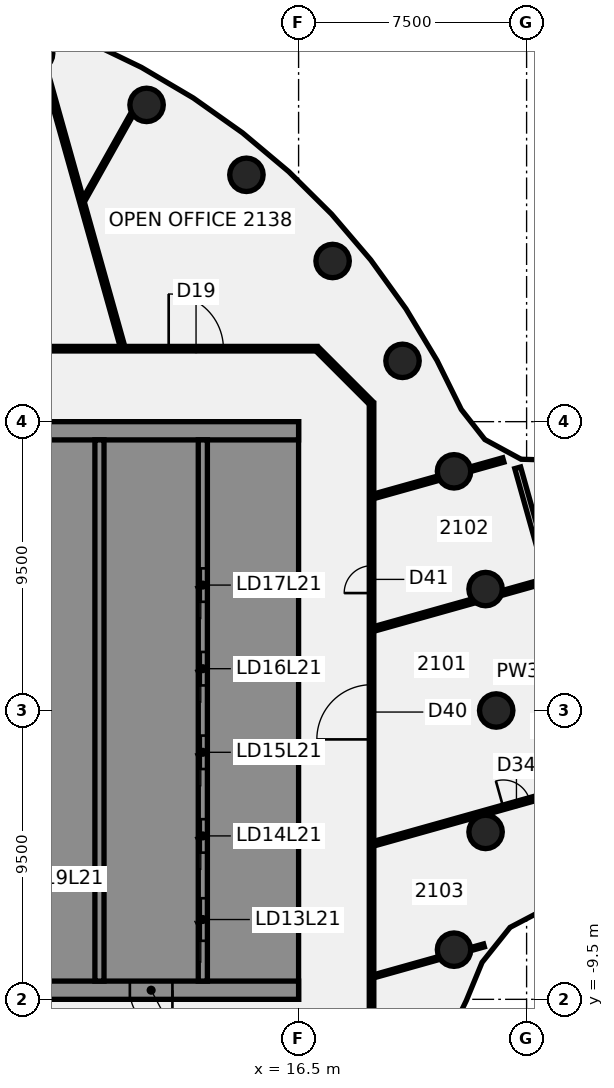
"""IFC4 building model, lengths in metres.
Left out: names, types, materials, properties, quantities, classifications, styles, units other than length and angle.
Written with IfcOpenShell. Run it as: python <this file> out.ifc"""

import sys

from ifc_helpers import new_model, si_unit, direction, frame, frame_2d, origin, origin_2d, place, context, subcontext, project, spatial, polyline, rectangle, circle, outline, extrude, element, fill, save


model = new_model("IFC4")
c1 = context("Model", 3, precision=1e-05, world=origin(), true_north=direction((0.0, 1.0)))
c2 = subcontext(c1, "Body", "Model", "MODEL_VIEW")
j1 = project(units=[si_unit("LENGTHUNIT", "METRE"), si_unit("PLANEANGLEUNIT", "RADIAN")], contexts=[c1])
p1 = place(None, origin())
s1 = spatial("IfcSite", under=j1, at=p1, CompositionType="ELEMENT")
p2 = place(p1, origin())
s2 = spatial("IfcBuilding", under=s1, at=p2, CompositionType="ELEMENT")
p3 = place(p2, frame((0.0, 0.0, 91.0)))
s3 = spatial("IfcBuildingStorey", under=s2, at=p3, CompositionType="ELEMENT", Elevation=91.0)
for number, where, z_axis, x_axis in (
    (1, (23.0, 0.0, -0.14), (0.0, 0.0, 1.0), (1.0, 0.0, 0.0)),
    (2, (22.651, 3.994, -0.14), (0.0, 0.0, 1.0), (1.0, 0.0, 0.0)),
    (3, (21.613, 7.866, -0.14), (0.0, 0.0, 1.0), (1.0, 0.0, 0.0)),
    (4, (19.919, 11.5, -0.14), (0.0, 0.0, 1.0), (1.0, 0.0, 0.0)),
    (5, (17.619, 14.784, -0.14), (0.0, 0.0, 1.0), (1.0, 0.0, 0.0)),
    (6, (14.784, 17.619, -0.14), (0.0, 0.0, 1.0), (1.0, 0.0, 0.0)),
    (7, (11.5, 19.919, -0.14), (0.0, 0.0, 1.0), (1.0, 0.0, 0.0)),
    (8, (7.866, 21.613, -0.14), (0.0, 0.0, 1.0), (1.0, 0.0, 0.0)),
    (9, (21.613, -7.866, -0.14), (0.0, 0.0, 1.0), (1.0, 0.0, 0.0)),
    (10, (22.651, -3.994, -0.14), (0.0, 0.0, 1.0), (1.0, 0.0, 0.0)),
):
    element("IfcColumn", number, at=place(p3, frame(where, z_axis=z_axis, x_axis=x_axis)), inside=s3, PredefinedType="COLUMN", context=c2, shape_type="SweptSolid", body=[
        extrude(circle(Radius=0.55, at=origin_2d()), origin(), (0.0, 0.0, 1.0), 3.75),
    ])
p4 = place(p3, frame((8.139, 21.126, 0.0), z_axis=(0.0, 0.0, 1.0), x_axis=(0.270065431149, -0.962841971924, 0.0)))
e11 = element("IfcWall", 11, at=p4, inside=s3, PredefinedType="PARTITIONING", context=c2, shape_type="SweptSolid", body=[
    extrude(rectangle(XDim=9.502, YDim=0.15, at=frame_2d((4.751, 0.0))), origin(), (0.0, 0.0, 1.0), 3.01),
])
p5 = place(p3, frame((23.707, 7.982, 0.0), z_axis=(0.0, 0.0, 1.0), x_axis=(0.270046796754, -0.96284719845, 0.0)))
e12 = element("IfcWall", 12, at=p5, inside=s3, PredefinedType="PARTITIONING", context=c2, shape_type="SweptSolid", body=[
    extrude(rectangle(XDim=13.924, YDim=0.2, at=frame_2d((6.962, 0.0))), origin(), (0.0, 0.0, 1.0), 3.01),
])
p6 = place(p5, frame((6.324, 0.0, 0.0)))
e13 = element("IfcOpeningElement", 13, at=p6, cuts=e12, PredefinedType="OPENING", context=c2, shape_type="SweptSolid", body=[
    extrude(rectangle(XDim=1.4, YDim=2.1, at=frame_2d((0.7, 1.05))), frame((0.0, 0.11, 0.0), z_axis=(0.0, -1.0, 0.0), x_axis=(1.0, 0.0, 0.0)), (0.0, 0.0, 1.0), 0.22),
])
p7 = place(p3, frame((17.128, 11.872, 0.0), z_axis=(0.0, 0.0, 1.0), x_axis=(0.707106781187, -0.707106781187, 0.0)))
e14 = element("IfcWall", 14, at=p7, inside=s3, PredefinedType="PARTITIONING", context=c2, shape_type="SweptSolid", body=[
    extrude(rectangle(XDim=2.465, YDim=0.15, at=frame_2d((1.232, 0.0))), origin(), (0.0, 0.0, 1.0), 3.01),
])
p8 = place(p3, frame((-17.065, 11.9, 0.0), z_axis=(0.0, 0.0, 1.0), x_axis=(1.0, 0.0, 0.0)))
e15 = element("IfcWall", 15, at=p8, inside=s3, PredefinedType="PARTITIONING", context=c2, shape_type="SweptSolid", body=[
    extrude(rectangle(XDim=34.165, YDim=0.15, at=frame_2d((17.083, 0.0))), origin(), (0.0, 0.0, 1.0), 3.01),
])
p9 = place(p8, frame((19.067, 0.0, 0.0)))
e16 = element("IfcOpeningElement", 16, at=p9, cuts=e15, PredefinedType="OPENING", context=c2, shape_type="SweptSolid", body=[
    extrude(rectangle(XDim=1.8, YDim=2.1, at=frame_2d((0.9, 1.05))), frame((0.0, 0.085, 0.0), z_axis=(0.0, -1.0, 0.0), x_axis=(1.0, 0.0, 0.0)), (0.0, 0.0, 1.0), 0.17),
])
p10 = place(p8, frame((29.292, 0.0, 0.0)))
e17 = element("IfcOpeningElement", 17, at=p10, cuts=e15, PredefinedType="OPENING", context=c2, shape_type="SweptSolid", body=[
    extrude(rectangle(XDim=1.8, YDim=2.1, at=frame_2d((0.9, 1.05))), frame((0.0, 0.085, 0.0), z_axis=(0.0, -1.0, 0.0), x_axis=(1.0, 0.0, 0.0)), (0.0, 0.0, 1.0), 0.17),
])
p11 = place(p8, frame((5.215, 0.0, 0.0)))
e18 = element("IfcOpeningElement", 18, at=p11, cuts=e15, PredefinedType="OPENING", context=c2, shape_type="SweptSolid", body=[
    extrude(rectangle(XDim=1.8, YDim=2.1, at=frame_2d((0.9, 1.05))), frame((0.0, 0.085, 0.0), z_axis=(0.0, -1.0, 0.0), x_axis=(1.0, 0.0, 0.0)), (0.0, 0.0, 1.0), 0.17),
])
p12 = place(p3, frame((18.977, -4.379, 0.0), z_axis=(0.0, 0.0, 1.0), x_axis=(0.962819006097, 0.270147295932, 0.0)))
e19 = element("IfcWall", 19, at=p12, inside=s3, PredefinedType="PARTITIONING", context=c2, shape_type="SweptSolid", body=[
    extrude(rectangle(XDim=7.788, YDim=0.15, at=frame_2d((3.894, 0.0))), origin(), (0.0, 0.0, 1.0), 3.01),
])
p13 = place(p12, frame((4.42, 0.0, 0.0)))
e20 = element("IfcOpeningElement", 20, at=p13, cuts=e19, PredefinedType="OPENING", context=c2, shape_type="SweptSolid", body=[
    extrude(rectangle(XDim=0.9, YDim=2.1, at=frame_2d((0.45, 1.05))), frame((0.0, 0.085, 0.0), z_axis=(0.0, -1.0, 0.0), x_axis=(1.0, 0.0, 0.0)), (0.0, 0.0, 1.0), 0.17),
])
p14 = place(p3, frame((18.977, 2.684, 0.0), z_axis=(0.0, 0.0, 1.0), x_axis=(0.962845365639, 0.270053331526, 0.0)))
e21 = element("IfcWall", 21, at=p14, inside=s3, PredefinedType="PARTITIONING", context=c2, shape_type="SweptSolid", body=[
    extrude(rectangle(XDim=3.422, YDim=0.15, at=frame_2d((1.711, 0.0))), origin(), (0.0, 0.0, 1.0), 3.01),
])
p15 = place(p3, frame((23.175, 3.861, 0.0), z_axis=(0.0, 0.0, 1.0), x_axis=(0.962859226114, 0.270003908653, 0.0)))
e22 = element("IfcWall", 22, at=p15, inside=s3, PredefinedType="PARTITIONING", context=c2, shape_type="SweptSolid", body=[
    extrude(rectangle(XDim=1.525, YDim=0.15, at=frame_2d((0.763, 0.0))), origin(), (0.0, 0.0, 1.0), 3.01),
])
p16 = place(p3, frame((18.977, 7.046, 0.0), z_axis=(0.0, 0.0, 1.0), x_axis=(0.962846161083, 0.270050495442, 0.0)))
e23 = element("IfcWall", 23, at=p16, inside=s3, PredefinedType="PARTITIONING", context=c2, shape_type="SweptSolid", body=[
    extrude(rectangle(XDim=2.218, YDim=0.15, at=frame_2d((1.109, 0.0))), origin(), (0.0, 0.0, 1.0), 3.01),
])
p17 = place(p3, frame((22.154, 7.937, 0.0), z_axis=(0.0, 0.0, 1.0), x_axis=(0.962819188594, 0.2701466455, 0.0)))
e24 = element("IfcWall", 24, at=p17, inside=s3, PredefinedType="PARTITIONING", context=c2, shape_type="SweptSolid", body=[
    extrude(rectangle(XDim=1.122, YDim=0.15, at=frame_2d((0.561, 0.0))), origin(), (0.0, 0.0, 1.0), 3.01),
])
p18 = place(p3, frame((18.972, -8.743, 0.0), z_axis=(0.0, 0.0, 1.0), x_axis=(0.962855122656, 0.270018541538, 0.0)))
e25 = element("IfcWall", 25, at=p18, inside=s3, PredefinedType="PARTITIONING", context=c2, shape_type="SweptSolid", body=[
    extrude(rectangle(XDim=2.237, YDim=0.1, at=frame_2d((1.118, 0.0))), origin(), (0.0, 0.0, 1.0), 3.01),
])
p19 = place(p3, frame((22.168, -7.847, 0.0), z_axis=(0.0, 0.0, 1.0), x_axis=(0.962855865138, 0.270015893921, 0.0)))
e26 = element("IfcWall", 26, at=p19, inside=s3, PredefinedType="PARTITIONING", context=c2, shape_type="SweptSolid", body=[
    extrude(rectangle(XDim=0.446, YDim=0.1, at=frame_2d((0.223, 0.0))), origin(), (0.0, 0.0, 1.0), 3.01),
])
p20 = place(p3, frame((9.447, 16.816, 0.0), z_axis=(0.0, 0.0, 1.0), x_axis=(0.489815478244, 0.871826127891, 0.0)))
e27 = element("IfcWall", 27, at=p20, inside=s3, PredefinedType="PARTITIONING", context=c2, shape_type="SweptSolid", body=[
    extrude(rectangle(XDim=3.225, YDim=0.1, at=frame_2d((1.612, 0.0))), origin(), (0.0, 0.0, 1.0), 3.01),
])
p21 = place(p3, frame((18.9, -10.1, 0.0), z_axis=(0.0, 0.0, 1.0), x_axis=(0.0, 1.0, 0.0)))
e28 = element("IfcWall", 28, at=p21, inside=s3, PredefinedType="PARTITIONING", context=c2, shape_type="SweptSolid", body=[
    extrude(rectangle(XDim=20.2, YDim=0.15, at=frame_2d((10.1, 0.0))), origin(), (0.0, 0.0, 1.0), 3.01),
])
p22 = place(p21, frame((9.149, 0.0, 0.0)))
e29 = element("IfcOpeningElement", 29, at=p22, cuts=e28, PredefinedType="OPENING", context=c2, shape_type="SweptSolid", body=[
    extrude(rectangle(XDim=1.8, YDim=2.1, at=frame_2d((0.9, 1.05))), frame((0.0, 0.085, 0.0), z_axis=(0.0, -1.0, 0.0), x_axis=(1.0, 0.0, 0.0)), (0.0, 0.0, 1.0), 0.17),
])
p23 = place(p21, frame((13.962, 0.0, 0.0)))
e30 = element("IfcOpeningElement", 30, at=p23, cuts=e28, PredefinedType="OPENING", context=c2, shape_type="SweptSolid", body=[
    extrude(rectangle(XDim=0.9, YDim=2.1, at=frame_2d((0.45, 1.05))), frame((0.0, 0.085, 0.0), z_axis=(0.0, -1.0, 0.0), x_axis=(1.0, 0.0, 0.0)), (0.0, 0.0, 1.0), 0.17),
])
p24 = place(p3, frame((16.5, -9.2, 0.0), z_axis=(0.0, 0.0, 1.0), x_axis=(-1.0, 0.0, 0.0)))
e31 = element("IfcWall", 31, at=p24, inside=s3, PredefinedType="SHEAR", context=c2, shape_type="SweptSolid", body=[
    extrude(rectangle(XDim=13.0, YDim=0.6, at=frame_2d((6.5, 0.0))), origin(), (0.0, 0.0, 1.0), 3.61),
])
p25 = place(p24, frame((4.15, 0.0, 0.0)))
e32 = element("IfcOpeningElement", 32, at=p25, cuts=e31, PredefinedType="OPENING", context=c2, shape_type="SweptSolid", body=[
    extrude(rectangle(XDim=1.4, YDim=2.1, at=frame_2d((0.7, 1.05))), frame((0.0, 0.31, 0.0), z_axis=(0.0, -1.0, 0.0), x_axis=(1.0, 0.0, 0.0)), (0.0, 0.0, 1.0), 0.62),
])
p26 = place(p24, frame((10.125, 0.0, 0.0)))
e33 = element("IfcOpeningElement", 33, at=p26, cuts=e31, PredefinedType="OPENING", context=c2, shape_type="SweptSolid", body=[
    extrude(rectangle(XDim=1.4, YDim=2.1, at=frame_2d((0.7, 1.05))), frame((0.0, 0.31, 0.0), z_axis=(0.0, -1.0, 0.0), x_axis=(1.0, 0.0, 0.0)), (0.0, 0.0, 1.0), 0.62),
])
p27 = place(p3, origin())
e34 = element("IfcWall", 34, at=p27, inside=s3, PredefinedType="SHEAR", context=c2, shape_type="SweptSolid", body=[
    extrude(outline(polyline([(13.5, -8.9), (15.9, -8.9), (16.5, -8.9), (16.5, 8.9), (15.9, 8.9), (13.5, 8.9), (13.5, 8.125), (15.9, 8.125), (15.9, 5.625), (13.5, 5.625), (13.5, 5.375), (15.9, 5.375), (15.9, 2.875), (13.5, 2.875), (13.5, 2.625), (15.9, 2.625), (15.9, 0.125), (13.5, 0.125), (13.5, -0.125), (15.9, -0.125), (15.9, -2.625), (13.5, -2.625), (13.5, -2.875), (15.9, -2.875), (15.9, -5.375), (13.5, -5.375), (13.5, -5.625), (15.9, -5.625), (15.9, -8.125), (13.5, -8.125), (13.5, -8.9)])), origin(), (0.0, 0.0, 1.0), 3.61),
])
p28 = place(p3, frame((16.5, 9.2, 0.0), z_axis=(0.0, 0.0, 1.0), x_axis=(-1.0, 0.0, 0.0)))
e35 = element("IfcWall", 35, at=p28, inside=s3, PredefinedType="SHEAR", context=c2, shape_type="SweptSolid", body=[
    extrude(rectangle(XDim=13.0, YDim=0.6, at=frame_2d((6.5, 0.0))), origin(), (0.0, 0.0, 1.0), 3.61),
])
p29 = place(p3, origin())
e36 = element("IfcWall", 36, at=p29, inside=s3, PredefinedType="SHEAR", context=c2, shape_type="SweptSolid", body=[
    extrude(outline(polyline([(9.8, -5.375), (7.5, -5.375), (7.5, -2.875), (9.8, -2.875), (9.8, -2.625), (7.5, -2.625), (7.5, -0.125), (9.8, -0.125), (9.8, 0.125), (7.5, 0.125), (7.5, 2.625), (9.8, 2.625), (9.8, 2.875), (7.5, 2.875), (7.5, 5.375), (9.8, 5.375), (9.8, 5.625), (7.5, 5.625), (7.5, 8.125), (9.8, 8.125), (9.8, 8.9), (7.5, 8.9), (7.2, 8.9), (7.2, -5.625), (7.5, -5.625), (9.8, -5.625), (9.8, -5.375)])), origin(), (0.0, 0.0, 1.0), 3.61),
])
p30 = place(p3, origin())
e37 = element("IfcWall", 37, at=p30, inside=s3, PredefinedType="SHEAR", context=c2, shape_type="SweptSolid", body=[
    extrude(outline(polyline([(7.5, -8.125), (7.5, -8.9), (9.8, -8.9), (9.8, -8.125), (9.8, -5.625), (9.55, -5.625), (9.55, -8.125), (7.5, -8.125)])), origin(), (0.0, 0.0, 1.0), 3.61),
])
p31 = place(p3, frame((13.35, -8.9, 0.0), z_axis=(0.0, 0.0, 1.0), x_axis=(0.0, 1.0, 0.0)))
e38 = element("IfcWall", 38, at=p31, inside=s3, PredefinedType="SHEAR", context=c2, shape_type="SweptSolid", body=[
    extrude(rectangle(XDim=17.8, YDim=0.3, at=frame_2d((8.9, 0.0))), origin(), (0.0, 0.0, 1.0), 3.61),
])
p32 = place(p31, frame((1.325, 0.0, 0.0)))
e39 = element("IfcOpeningElement", 39, at=p32, cuts=e38, PredefinedType="OPENING", context=c2, shape_type="SweptSolid", body=[
    extrude(rectangle(XDim=1.4, YDim=2.1, at=frame_2d((0.7, 1.05))), frame((0.0, 0.16, 0.0), z_axis=(0.0, -1.0, 0.0), x_axis=(1.0, 0.0, 0.0)), (0.0, 0.0, 1.0), 0.32),
])
p33 = place(p31, frame((4.225, 0.0, 0.0)))
e40 = element("IfcOpeningElement", 40, at=p33, cuts=e38, PredefinedType="OPENING", context=c2, shape_type="SweptSolid", body=[
    extrude(rectangle(XDim=1.1, YDim=2.1, at=frame_2d((0.55, 1.05))), frame((0.0, 0.16, 0.0), z_axis=(0.0, -1.0, 0.0), x_axis=(1.0, 0.0, 0.0)), (0.0, 0.0, 1.0), 0.32),
])
p34 = place(p31, frame((6.975, 0.0, 0.0)))
e41 = element("IfcOpeningElement", 41, at=p34, cuts=e38, PredefinedType="OPENING", context=c2, shape_type="SweptSolid", body=[
    extrude(rectangle(XDim=1.1, YDim=2.1, at=frame_2d((0.55, 1.05))), frame((0.0, 0.16, 0.0), z_axis=(0.0, -1.0, 0.0), x_axis=(1.0, 0.0, 0.0)), (0.0, 0.0, 1.0), 0.32),
])
p35 = place(p31, frame((9.725, 0.0, 0.0)))
e42 = element("IfcOpeningElement", 42, at=p35, cuts=e38, PredefinedType="OPENING", context=c2, shape_type="SweptSolid", body=[
    extrude(rectangle(XDim=1.1, YDim=2.1, at=frame_2d((0.55, 1.05))), frame((0.0, 0.16, 0.0), z_axis=(0.0, -1.0, 0.0), x_axis=(1.0, 0.0, 0.0)), (0.0, 0.0, 1.0), 0.32),
])
p36 = place(p31, frame((12.475, 0.0, 0.0)))
e43 = element("IfcOpeningElement", 43, at=p36, cuts=e38, PredefinedType="OPENING", context=c2, shape_type="SweptSolid", body=[
    extrude(rectangle(XDim=1.1, YDim=2.1, at=frame_2d((0.55, 1.05))), frame((0.0, 0.16, 0.0), z_axis=(0.0, -1.0, 0.0), x_axis=(1.0, 0.0, 0.0)), (0.0, 0.0, 1.0), 0.32),
])
p37 = place(p3, frame((9.95, -8.9, 0.0), z_axis=(0.0, 0.0, 1.0), x_axis=(0.0, 1.0, 0.0)))
e44 = element("IfcWall", 44, at=p37, inside=s3, PredefinedType="SHEAR", context=c2, shape_type="SweptSolid", body=[
    extrude(rectangle(XDim=17.8, YDim=0.3, at=frame_2d((8.9, 0.0))), origin(), (0.0, 0.0, 1.0), 3.61),
])
p38 = place(p10, origin())
e45 = element("IfcDoor", 45, at=p38, inside=s3, OperationType="DOUBLE_DOOR_SINGLE_SWING", PredefinedType="DOOR", context=c2, shape_type="SweptSolid", body=[
    extrude(rectangle(XDim=1.8, YDim=2.1, at=frame_2d((0.9, 1.05))), frame((0.0, 0.025, 0.0), z_axis=(0.0, -1.0, 0.0), x_axis=(1.0, 0.0, 0.0)), (0.0, 0.0, 1.0), 0.05),
])
fill(e17, e45)
p39 = place(p13, frame((0.9, 0.0, 0.0), z_axis=(0.0, 0.0, 1.0), x_axis=(-1.0, 0.0, 0.0)))
e46 = element("IfcDoor", 46, at=p39, inside=s3, OperationType="SINGLE_SWING_RIGHT", PredefinedType="DOOR", context=c2, shape_type="SweptSolid", body=[
    extrude(rectangle(XDim=0.9, YDim=2.1, at=frame_2d((0.45, 1.05))), frame((0.0, 0.025, 0.0), z_axis=(0.0, -1.0, 0.0), x_axis=(1.0, 0.0, 0.0)), (0.0, 0.0, 1.0), 0.05),
])
fill(e20, e46)
p40 = place(p22, origin())
e47 = element("IfcDoor", 47, at=p40, inside=s3, OperationType="DOUBLE_DOOR_SINGLE_SWING", PredefinedType="DOOR", context=c2, shape_type="SweptSolid", body=[
    extrude(rectangle(XDim=1.8, YDim=2.1, at=frame_2d((0.9, 1.05))), frame((0.0, 0.025, 0.0), z_axis=(0.0, -1.0, 0.0), x_axis=(1.0, 0.0, 0.0)), (0.0, 0.0, 1.0), 0.05),
])
fill(e29, e47)
p41 = place(p23, frame((0.9, 0.0, 0.0), z_axis=(0.0, 0.0, 1.0), x_axis=(-1.0, 0.0, 0.0)))
e48 = element("IfcDoor", 48, at=p41, inside=s3, OperationType="SINGLE_SWING_RIGHT", PredefinedType="DOOR", context=c2, shape_type="SweptSolid", body=[
    extrude(rectangle(XDim=0.9, YDim=2.1, at=frame_2d((0.45, 1.05))), frame((0.0, 0.025, 0.0), z_axis=(0.0, -1.0, 0.0), x_axis=(1.0, 0.0, 0.0)), (0.0, 0.0, 1.0), 0.05),
])
fill(e30, e48)
p42 = place(p25, origin())
e49 = element("IfcDoor", 49, at=p42, inside=s3, OperationType="SINGLE_SWING_LEFT", PredefinedType="DOOR", context=c2, shape_type="SweptSolid", body=[
    extrude(rectangle(XDim=1.4, YDim=2.1, at=frame_2d((0.7, 1.05))), frame((0.0, 0.025, 0.0), z_axis=(0.0, -1.0, 0.0), x_axis=(1.0, 0.0, 0.0)), (0.0, 0.0, 1.0), 0.05),
])
fill(e32, e49)
p43 = place(p32, origin())
e50 = element("IfcDoor", 50, at=p43, inside=s3, OperationType="SLIDING_TO_LEFT", PredefinedType="DOOR", context=c2, shape_type="SweptSolid", body=[
    extrude(rectangle(XDim=1.4, YDim=2.1, at=frame_2d((0.7, 1.05))), frame((0.0, 0.025, 0.0), z_axis=(0.0, -1.0, 0.0), x_axis=(1.0, 0.0, 0.0)), (0.0, 0.0, 1.0), 0.05),
])
fill(e39, e50)
p44 = place(p33, origin())
e51 = element("IfcDoor", 51, at=p44, inside=s3, OperationType="SLIDING_TO_LEFT", PredefinedType="DOOR", context=c2, shape_type="SweptSolid", body=[
    extrude(rectangle(XDim=1.1, YDim=2.1, at=frame_2d((0.55, 1.05))), frame((0.0, 0.025, 0.0), z_axis=(0.0, -1.0, 0.0), x_axis=(1.0, 0.0, 0.0)), (0.0, 0.0, 1.0), 0.05),
])
fill(e40, e51)
p45 = place(p34, origin())
e52 = element("IfcDoor", 52, at=p45, inside=s3, OperationType="SLIDING_TO_LEFT", PredefinedType="DOOR", context=c2, shape_type="SweptSolid", body=[
    extrude(rectangle(XDim=1.1, YDim=2.1, at=frame_2d((0.55, 1.05))), frame((0.0, 0.025, 0.0), z_axis=(0.0, -1.0, 0.0), x_axis=(1.0, 0.0, 0.0)), (0.0, 0.0, 1.0), 0.05),
])
fill(e41, e52)
p46 = place(p35, origin())
e53 = element("IfcDoor", 53, at=p46, inside=s3, OperationType="SLIDING_TO_LEFT", PredefinedType="DOOR", context=c2, shape_type="SweptSolid", body=[
    extrude(rectangle(XDim=1.1, YDim=2.1, at=frame_2d((0.55, 1.05))), frame((0.0, 0.025, 0.0), z_axis=(0.0, -1.0, 0.0), x_axis=(1.0, 0.0, 0.0)), (0.0, 0.0, 1.0), 0.05),
])
fill(e42, e53)
p47 = place(p36, origin())
e54 = element("IfcDoor", 54, at=p47, inside=s3, OperationType="SLIDING_TO_LEFT", PredefinedType="DOOR", context=c2, shape_type="SweptSolid", body=[
    extrude(rectangle(XDim=1.1, YDim=2.1, at=frame_2d((0.55, 1.05))), frame((0.0, 0.025, 0.0), z_axis=(0.0, -1.0, 0.0), x_axis=(1.0, 0.0, 0.0)), (0.0, 0.0, 1.0), 0.05),
])
fill(e43, e54)
save(model, sys.argv[1])
